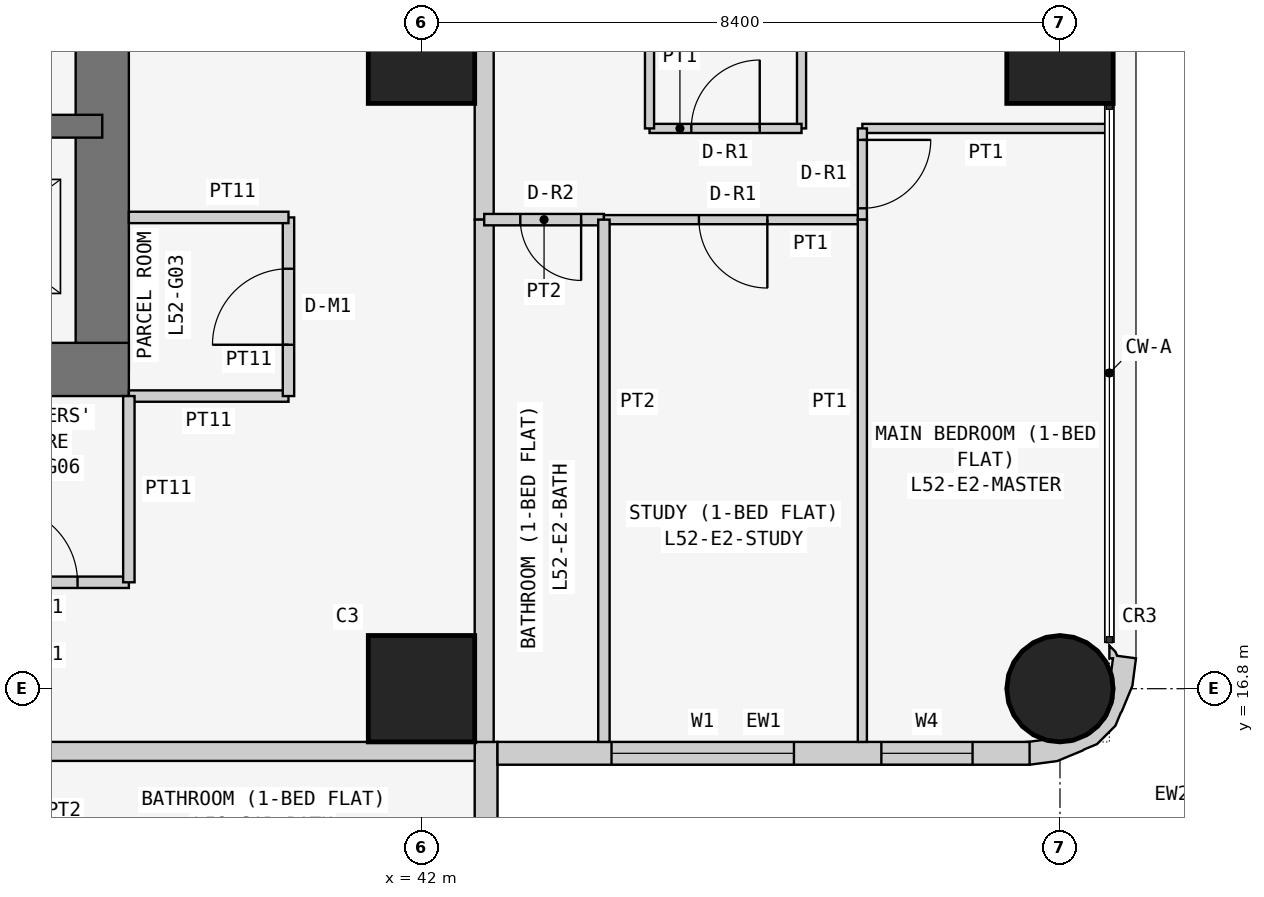
"""IFC4 building model, lengths in metres.
Left out: names, types, materials, properties, quantities, classifications, styles, units other than length and angle.
Written with IfcOpenShell. Run it as: python <this file> out.ifc"""

import sys

from ifc_helpers import new_model, si_unit, direction, frame, frame_2d, origin, origin_2d, place, context, subcontext, project, spatial, polyline, rectangle, circle, outline, extrude, element, fill, save


model = new_model("IFC4")
c1 = context("Model", 3, precision=1e-05, world=origin(), true_north=direction((0.0, 1.0)))
c2 = subcontext(c1, "Body", "Model", "MODEL_VIEW")
j1 = project(units=[si_unit("LENGTHUNIT", "METRE"), si_unit("PLANEANGLEUNIT", "RADIAN")], contexts=[c1])
p1 = place(None, origin())
s1 = spatial("IfcSite", under=j1, at=p1, CompositionType="ELEMENT")
p2 = place(p1, origin())
s2 = spatial("IfcBuilding", under=s1, at=p2, CompositionType="ELEMENT")
p3 = place(p2, frame((0.0, 0.0, 201.3)))
s3 = spatial("IfcBuildingStorey", under=s2, at=p3, CompositionType="ELEMENT", Elevation=201.3)
for number, where, z_axis, x_axis in (
    (1, (42.0, 16.8, 0.0), (0.0, 0.0, 1.0), (1.0, 0.0, 0.0)),
    (2, (42.0, 25.2, 0.0), (0.0, 0.0, 1.0), (1.0, 0.0, 0.0)),
):
    element("IfcColumn", number, at=place(p3, frame(where, z_axis=z_axis, x_axis=x_axis)), inside=s3, PredefinedType="COLUMN", context=c2, shape_type="SweptSolid", body=[
        extrude(rectangle(XDim=1.4, YDim=1.4, at=origin_2d()), origin(), (0.0, 0.0, 1.0), 3.6),
    ])
p4 = place(p3, frame((50.4, 16.8, 0.0), z_axis=(0.0, 0.0, 1.0), x_axis=(1.0, 0.0, 0.0)))
e3 = element("IfcColumn", 3, at=p4, inside=s3, PredefinedType="COLUMN", context=c2, shape_type="SweptSolid", body=[
    extrude(circle(Radius=0.7, at=origin_2d()), origin(), (0.0, 0.0, 1.0), 3.6),
])
p5 = place(p3, frame((50.4, 25.2, 0.0), z_axis=(0.0, 0.0, 1.0), x_axis=(1.0, 0.0, 0.0)))
e4 = element("IfcColumn", 4, at=p5, inside=s3, PredefinedType="COLUMN", context=c2, shape_type="SweptSolid", body=[
    extrude(rectangle(XDim=1.4, YDim=1.4, at=origin_2d()), origin(), (0.0, 0.0, 1.0), 3.6),
])
p6 = place(p3, frame((21.0, 21.0, 0.0), z_axis=(0.0, 0.0, 1.0), x_axis=(1.0, 0.0, 0.0)))
e5 = element("IfcWall", 5, at=p6, inside=s3, PredefinedType="SHEAR", context=c2, shape_type="SweptSolid", body=[
    extrude(rectangle(XDim=17.15, YDim=0.7, at=frame_2d((8.575, 0.0))), origin(), (0.0, 0.0, 1.0), 3.6),
])
p7 = place(p3, frame((37.8, 21.0, 0.0), z_axis=(0.0, 0.0, 1.0), x_axis=(0.0, 1.0, 0.0)))
e6 = element("IfcWall", 6, at=p7, inside=s3, PredefinedType="SHEAR", context=c2, shape_type="SweptSolid", body=[
    extrude(rectangle(XDim=17.15, YDim=0.7, at=frame_2d((8.575, 0.0))), origin(), (0.0, 0.0, 1.0), 3.6),
])
p8 = place(p7, frame((5.2, 0.0, 0.0)))
e7 = element("IfcOpeningElement", 7, at=p8, cuts=e6, PredefinedType="OPENING", context=c2, shape_type="SweptSolid", body=[
    extrude(rectangle(XDim=1.2, YDim=2.1, at=frame_2d((0.6, 1.05))), frame((0.0, 0.36, 0.0), z_axis=(0.0, -1.0, 0.0), x_axis=(1.0, 0.0, 0.0)), (0.0, 0.0, 1.0), 0.72),
])
p9 = place(p3, frame((26.6, 24.2, 0.0), z_axis=(0.0, 0.0, 1.0), x_axis=(1.0, 0.0, 0.0)))
e8 = element("IfcWall", 8, at=p9, inside=s3, PredefinedType="SHEAR", context=c2, shape_type="SweptSolid", body=[
    extrude(rectangle(XDim=11.2, YDim=0.3, at=frame_2d((5.6, 0.0))), origin(), (0.0, 0.0, 1.0), 3.6),
])
p10 = place(p9, frame((0.913, 0.0, 0.0)))
e9 = element("IfcOpeningElement", 9, at=p10, cuts=e8, PredefinedType="OPENING", context=c2, shape_type="SweptSolid", body=[
    extrude(rectangle(XDim=1.0, YDim=2.1, at=frame_2d((0.5, 1.05))), frame((0.0, 0.16, 0.0), z_axis=(0.0, -1.0, 0.0), x_axis=(1.0, 0.0, 0.0)), (0.0, 0.0, 1.0), 0.32),
])
p11 = place(p9, frame((3.75, 0.0, 0.0)))
e10 = element("IfcOpeningElement", 10, at=p11, cuts=e8, PredefinedType="OPENING", context=c2, shape_type="SweptSolid", body=[
    extrude(rectangle(XDim=0.9, YDim=2.1, at=frame_2d((0.45, 1.05))), frame((0.0, 0.16, 0.0), z_axis=(0.0, -1.0, 0.0), x_axis=(1.0, 0.0, 0.0)), (0.0, 0.0, 1.0), 0.32),
])
p12 = place(p9, frame((6.45, 0.0, 0.0)))
e11 = element("IfcOpeningElement", 11, at=p12, cuts=e8, PredefinedType="OPENING", context=c2, shape_type="SweptSolid", body=[
    extrude(rectangle(XDim=1.1, YDim=2.1, at=frame_2d((0.55, 1.05))), frame((0.0, 0.16, 0.0), z_axis=(0.0, -1.0, 0.0), x_axis=(1.0, 0.0, 0.0)), (0.0, 0.0, 1.0), 0.32),
])
p13 = place(p9, frame((9.1, 0.0, 0.0)))
e12 = element("IfcOpeningElement", 12, at=p13, cuts=e8, PredefinedType="OPENING", context=c2, shape_type="SweptSolid", body=[
    extrude(rectangle(XDim=1.1, YDim=2.1, at=frame_2d((0.55, 1.05))), frame((0.0, 0.16, 0.0), z_axis=(0.0, -1.0, 0.0), x_axis=(1.0, 0.0, 0.0)), (0.0, 0.0, 1.0), 0.32),
])
p14 = place(p3, frame((42.85, 8.8, 0.0), z_axis=(0.0, 0.0, 1.0), x_axis=(0.0, 1.0, 0.0)))
e13 = element("IfcWall", 13, at=p14, inside=s3, PredefinedType="SOLIDWALL", context=c2, shape_type="SweptSolid", body=[
    extrude(rectangle(XDim=7.3, YDim=0.3, at=frame_2d((3.65, 0.0))), origin(), (0.0, 0.0, 1.0), 3.45),
])
p15 = place(p14, frame((3.1, 0.0, 0.9)))
e14 = element("IfcOpeningElement", 14, at=p15, cuts=e13, PredefinedType="OPENING", context=c2, shape_type="SweptSolid", body=[
    extrude(rectangle(XDim=2.4, YDim=1.5, at=frame_2d((1.2, 0.75))), frame((0.0, 0.16, 0.0), z_axis=(0.0, -1.0, 0.0), x_axis=(1.0, 0.0, 0.0)), (0.0, 0.0, 1.0), 0.32),
])
p16 = place(p14, frame((0.75, 0.0, 0.9)))
e15 = element("IfcOpeningElement", 15, at=p16, cuts=e13, PredefinedType="OPENING", context=c2, shape_type="SweptSolid", body=[
    extrude(rectangle(XDim=1.2, YDim=1.5, at=frame_2d((0.6, 0.75))), frame((0.0, 0.16, 0.0), z_axis=(0.0, -1.0, 0.0), x_axis=(1.0, 0.0, 0.0)), (0.0, 0.0, 1.0), 0.32),
])
p17 = place(p3, frame((43.0, 15.95, 0.0), z_axis=(0.0, 0.0, 1.0), x_axis=(1.0, 0.0, 0.0)))
e16 = element("IfcWall", 16, at=p17, inside=s3, PredefinedType="SOLIDWALL", context=c2, shape_type="SweptSolid", body=[
    extrude(rectangle(XDim=7.0, YDim=0.3, at=frame_2d((3.5, 0.0))), origin(), (0.0, 0.0, 1.0), 3.45),
])
p18 = place(p17, frame((1.5, 0.0, 0.9)))
e17 = element("IfcOpeningElement", 17, at=p18, cuts=e16, PredefinedType="OPENING", context=c2, shape_type="SweptSolid", body=[
    extrude(rectangle(XDim=2.4, YDim=1.5, at=frame_2d((1.2, 0.75))), frame((0.0, 0.16, 0.0), z_axis=(0.0, -1.0, 0.0), x_axis=(1.0, 0.0, 0.0)), (0.0, 0.0, 1.0), 0.32),
])
p19 = place(p17, frame((5.05, 0.0, 0.9)))
e18 = element("IfcOpeningElement", 18, at=p19, cuts=e16, PredefinedType="OPENING", context=c2, shape_type="SweptSolid", body=[
    extrude(rectangle(XDim=1.2, YDim=1.5, at=frame_2d((0.6, 0.75))), frame((0.0, 0.16, 0.0), z_axis=(0.0, -1.0, 0.0), x_axis=(1.0, 0.0, 0.0)), (0.0, 0.0, 1.0), 0.32),
])
p20 = place(p3, frame((50.11, 16.076, 0.0), z_axis=(0.0, 0.0, 1.0), x_axis=(0.898030234854, -0.439933741929, 0.0)))
e19 = element("IfcWall", 19, at=p20, inside=s3, PredefinedType="SOLIDWALL", context=c2, shape_type="SweptSolid", body=[
    extrude(outline(polyline([(0.664, 1.577), (0.426, 1.497), (0.382, 1.536), (0.276, 1.572), (0.349, 1.423), (0.392, 1.444), (0.453, 1.261), (0.51, 1.211), (0.632, 0.961), (0.65, 0.683), (0.56, 0.419), (0.375, 0.21), (0.125, 0.087), (0.05, 0.082), (-0.128, -0.035), (-0.145, -0.044), (0.022, -0.296), (0.327, -0.094), (0.568, 0.18), (0.577, 0.199), (0.7, 0.337), (0.811, 0.661), (0.799, 0.846), (0.803, 0.866), (0.78, 1.231), (0.664, 1.577)])), origin(), (0.0, 0.0, 1.0), 3.45),
])
p21 = place(p3, frame((38.15, 20.65, 0.0), z_axis=(0.0, 0.0, 1.0), x_axis=(1.0, 0.0, 0.0)))
e20 = element("IfcWall", 20, at=p21, inside=s3, PredefinedType="PARTITIONING", context=c2, shape_type="SweptSolid", body=[
    extrude(rectangle(XDim=2.1, YDim=0.15, at=frame_2d((1.05, 0.0))), origin(), (0.0, 0.0, 1.0), 3.45),
])
p22 = place(p3, frame((40.25, 20.65, 0.0), z_axis=(0.0, 0.0, 1.0), x_axis=(0.0, 1.0, 0.0)))
e21 = element("IfcWall", 21, at=p22, inside=s3, PredefinedType="PARTITIONING", context=c2, shape_type="SweptSolid", body=[
    extrude(rectangle(XDim=2.35, YDim=0.15, at=frame_2d((1.175, 0.0))), origin(), (0.0, 0.0, 1.0), 3.45),
])
p23 = place(p22, frame((0.675, 0.0, 0.0)))
e22 = element("IfcOpeningElement", 22, at=p23, cuts=e21, PredefinedType="OPENING", context=c2, shape_type="SweptSolid", body=[
    extrude(rectangle(XDim=1.0, YDim=2.1, at=frame_2d((0.5, 1.05))), frame((0.0, 0.085, 0.0), z_axis=(0.0, -1.0, 0.0), x_axis=(1.0, 0.0, 0.0)), (0.0, 0.0, 1.0), 0.17),
])
p24 = place(p3, frame((40.25, 23.0, 0.0), z_axis=(0.0, 0.0, 1.0), x_axis=(-1.0, 0.0, 0.0)))
e23 = element("IfcWall", 23, at=p24, inside=s3, PredefinedType="PARTITIONING", context=c2, shape_type="SweptSolid", body=[
    extrude(rectangle(XDim=2.1, YDim=0.15, at=frame_2d((1.05, 0.0))), origin(), (0.0, 0.0, 1.0), 3.45),
])
p25 = place(p3, frame((35.8, 18.2, 0.0), z_axis=(0.0, 0.0, 1.0), x_axis=(1.0, 0.0, 0.0)))
e24 = element("IfcWall", 24, at=p25, inside=s3, PredefinedType="PARTITIONING", context=c2, shape_type="SweptSolid", body=[
    extrude(rectangle(XDim=2.35, YDim=0.15, at=frame_2d((1.175, 0.0))), origin(), (0.0, 0.0, 1.0), 3.45),
])
p26 = place(p25, frame((0.675, 0.0, 0.0)))
e25 = element("IfcOpeningElement", 25, at=p26, cuts=e24, PredefinedType="OPENING", context=c2, shape_type="SweptSolid", body=[
    extrude(rectangle(XDim=1.0, YDim=2.1, at=frame_2d((0.5, 1.05))), frame((0.0, 0.085, 0.0), z_axis=(0.0, -1.0, 0.0), x_axis=(1.0, 0.0, 0.0)), (0.0, 0.0, 1.0), 0.17),
])
p27 = place(p3, frame((38.15, 18.2, 0.0), z_axis=(0.0, 0.0, 1.0), x_axis=(0.0, 1.0, 0.0)))
e26 = element("IfcWall", 26, at=p27, inside=s3, PredefinedType="PARTITIONING", context=c2, shape_type="SweptSolid", body=[
    extrude(rectangle(XDim=2.45, YDim=0.15, at=frame_2d((1.225, 0.0))), origin(), (0.0, 0.0, 1.0), 3.45),
])
p28 = place(p3, frame((42.825, 29.4, 0.0), z_axis=(0.0, 0.0, 1.0), x_axis=(0.0, -1.0, 0.0)))
e27 = element("IfcWall", 27, at=p28, inside=s3, PredefinedType="PARTITIONING", context=c2, shape_type="SweptSolid", body=[
    extrude(rectangle(XDim=6.429, YDim=0.25, at=frame_2d((3.214, 0.0))), origin(), (0.0, 0.0, 1.0), 3.45),
])
p29 = place(p28, frame((0.5, 0.0, 0.0)))
e28 = element("IfcOpeningElement", 28, at=p29, cuts=e27, PredefinedType="OPENING", context=c2, shape_type="SweptSolid", body=[
    extrude(rectangle(XDim=1.0, YDim=2.1, at=frame_2d((0.5, 1.05))), frame((0.0, 0.135, 0.0), z_axis=(0.0, -1.0, 0.0), x_axis=(1.0, 0.0, 0.0)), (0.0, 0.0, 1.0), 0.27),
])
p30 = place(p3, frame((42.825, 22.971, 0.0), z_axis=(0.0, 0.0, 1.0), x_axis=(0.0, -1.0, 0.0)))
e29 = element("IfcWall", 29, at=p30, inside=s3, PredefinedType="PARTITIONING", context=c2, shape_type="SweptSolid", body=[
    extrude(rectangle(XDim=6.871, YDim=0.25, at=frame_2d((3.436, 0.0))), origin(), (0.0, 0.0, 1.0), 3.45),
])
p31 = place(p3, frame((42.7, 15.975, 0.0), z_axis=(0.0, 0.0, 1.0), x_axis=(-1.0, 0.0, 0.0)))
e30 = element("IfcWall", 30, at=p31, inside=s3, PredefinedType="PARTITIONING", context=c2, shape_type="SweptSolid", body=[
    extrude(rectangle(XDim=6.471, YDim=0.25, at=frame_2d((3.235, 0.0))), origin(), (0.0, 0.0, 1.0), 3.45),
])
p32 = place(p3, frame((47.0, 29.4, 0.0), z_axis=(0.0, 0.0, 1.0), x_axis=(0.0, -1.0, 0.0)))
e31 = element("IfcWall", 31, at=p32, inside=s3, PredefinedType="PARTITIONING", context=c2, shape_type="SweptSolid", body=[
    extrude(rectangle(XDim=5.229, YDim=0.12, at=frame_2d((2.615, 0.0))), origin(), (0.0, 0.0, 1.0), 3.45),
])
p33 = place(p3, frame((47.0, 24.171, 0.0), z_axis=(0.0, 0.0, 1.0), x_axis=(-1.0, 0.0, 0.0)))
e32 = element("IfcWall", 32, at=p33, inside=s3, PredefinedType="PARTITIONING", context=c2, shape_type="SweptSolid", body=[
    extrude(rectangle(XDim=2.0, YDim=0.12, at=frame_2d((1.0, 0.0))), origin(), (0.0, 0.0, 1.0), 3.45),
])
p34 = place(p33, frame((0.55, 0.0, 0.0)))
e33 = element("IfcOpeningElement", 33, at=p34, cuts=e32, PredefinedType="OPENING", context=c2, shape_type="SweptSolid", body=[
    extrude(rectangle(XDim=0.9, YDim=2.1, at=frame_2d((0.45, 1.05))), frame((0.0, 0.07, 0.0), z_axis=(0.0, -1.0, 0.0), x_axis=(1.0, 0.0, 0.0)), (0.0, 0.0, 1.0), 0.14),
])
p35 = place(p3, frame((45.0, 24.171, 0.0), z_axis=(0.0, 0.0, 1.0), x_axis=(0.0, 1.0, 0.0)))
e34 = element("IfcWall", 34, at=p35, inside=s3, PredefinedType="PARTITIONING", context=c2, shape_type="SweptSolid", body=[
    extrude(rectangle(XDim=5.229, YDim=0.12, at=frame_2d((2.615, 0.0))), origin(), (0.0, 0.0, 1.0), 3.45),
])
p36 = place(p3, frame((44.4, 22.971, 0.0), z_axis=(0.0, 0.0, 1.0), x_axis=(-1.0, 0.0, 0.0)))
e35 = element("IfcWall", 35, at=p36, inside=s3, PredefinedType="PARTITIONING", context=c2, shape_type="SweptSolid", body=[
    extrude(rectangle(XDim=1.575, YDim=0.15, at=frame_2d((0.788, 0.0))), origin(), (0.0, 0.0, 1.0), 3.45),
])
p37 = place(p36, frame((0.3, 0.0, 0.0)))
e36 = element("IfcOpeningElement", 36, at=p37, cuts=e35, PredefinedType="OPENING", context=c2, shape_type="SweptSolid", body=[
    extrude(rectangle(XDim=0.8, YDim=2.1, at=frame_2d((0.4, 1.05))), frame((0.0, 0.085, 0.0), z_axis=(0.0, -1.0, 0.0), x_axis=(1.0, 0.0, 0.0)), (0.0, 0.0, 1.0), 0.17),
])
p38 = place(p3, frame((47.8, 22.971, 0.0), z_axis=(0.0, 0.0, 1.0), x_axis=(-1.0, 0.0, 0.0)))
e37 = element("IfcWall", 37, at=p38, inside=s3, PredefinedType="PARTITIONING", context=c2, shape_type="SweptSolid", body=[
    extrude(rectangle(XDim=3.4, YDim=0.12, at=frame_2d((1.7, 0.0))), origin(), (0.0, 0.0, 1.0), 3.45),
])
p39 = place(p38, frame((1.25, 0.0, 0.0)))
e38 = element("IfcOpeningElement", 38, at=p39, cuts=e37, PredefinedType="OPENING", context=c2, shape_type="SweptSolid", body=[
    extrude(rectangle(XDim=0.9, YDim=2.1, at=frame_2d((0.45, 1.05))), frame((0.0, 0.07, 0.0), z_axis=(0.0, -1.0, 0.0), x_axis=(1.0, 0.0, 0.0)), (0.0, 0.0, 1.0), 0.14),
])
p40 = place(p3, frame((51.05, 24.171, 0.0), z_axis=(0.0, 0.0, 1.0), x_axis=(-1.0, 0.0, 0.0)))
e39 = element("IfcWall", 39, at=p40, inside=s3, PredefinedType="PARTITIONING", context=c2, shape_type="SweptSolid", body=[
    extrude(rectangle(XDim=3.25, YDim=0.12, at=frame_2d((1.625, 0.0))), origin(), (0.0, 0.0, 1.0), 3.45),
])
p41 = place(p3, frame((47.8, 24.171, 0.0), z_axis=(0.0, 0.0, 1.0), x_axis=(0.0, -1.0, 0.0)))
e40 = element("IfcWall", 40, at=p41, inside=s3, PredefinedType="PARTITIONING", context=c2, shape_type="SweptSolid", body=[
    extrude(rectangle(XDim=1.2, YDim=0.12, at=frame_2d((0.6, 0.0))), origin(), (0.0, 0.0, 1.0), 3.45),
])
p42 = place(p41, frame((0.151, 0.0, 0.0)))
e41 = element("IfcOpeningElement", 41, at=p42, cuts=e40, PredefinedType="OPENING", context=c2, shape_type="SweptSolid", body=[
    extrude(rectangle(XDim=0.9, YDim=2.1, at=frame_2d((0.45, 1.05))), frame((0.0, 0.07, 0.0), z_axis=(0.0, -1.0, 0.0), x_axis=(1.0, 0.0, 0.0)), (0.0, 0.0, 1.0), 0.14),
])
p43 = place(p3, frame((44.4, 22.971, 0.0), z_axis=(0.0, 0.0, 1.0), x_axis=(0.0, -1.0, 0.0)))
e42 = element("IfcWall", 42, at=p43, inside=s3, PredefinedType="PARTITIONING", context=c2, shape_type="SweptSolid", body=[
    extrude(rectangle(XDim=6.871, YDim=0.15, at=frame_2d((3.436, 0.0))), origin(), (0.0, 0.0, 1.0), 3.45),
])
p44 = place(p3, frame((47.8, 22.971, 0.0), z_axis=(0.0, 0.0, 1.0), x_axis=(0.0, -1.0, 0.0)))
e43 = element("IfcWall", 43, at=p44, inside=s3, PredefinedType="PARTITIONING", context=c2, shape_type="SweptSolid", body=[
    extrude(rectangle(XDim=6.871, YDim=0.12, at=frame_2d((3.436, 0.0))), origin(), (0.0, 0.0, 1.0), 3.45),
])
p45 = place(p18, origin())
e44 = element("IfcWindow", 44, at=p45, inside=s3, PartitioningType="SINGLE_PANEL", PredefinedType="WINDOW", context=c2, shape_type="SweptSolid", body=[
    extrude(rectangle(XDim=2.4, YDim=1.5, at=frame_2d((1.2, 0.75))), frame((0.0, 0.03, 0.0), z_axis=(0.0, -1.0, 0.0), x_axis=(1.0, 0.0, 0.0)), (0.0, 0.0, 1.0), 0.06),
])
fill(e17, e44)
p46 = place(p19, origin())
e45 = element("IfcWindow", 45, at=p46, inside=s3, PartitioningType="SINGLE_PANEL", PredefinedType="WINDOW", context=c2, shape_type="SweptSolid", body=[
    extrude(rectangle(XDim=1.2, YDim=1.5, at=frame_2d((0.6, 0.75))), frame((0.0, 0.03, 0.0), z_axis=(0.0, -1.0, 0.0), x_axis=(1.0, 0.0, 0.0)), (0.0, 0.0, 1.0), 0.06),
])
fill(e18, e45)
p47 = place(p23, origin())
e46 = element("IfcDoor", 46, at=p47, inside=s3, OperationType="SINGLE_SWING_LEFT", PredefinedType="DOOR", context=c2, shape_type="SweptSolid", body=[
    extrude(rectangle(XDim=1.0, YDim=2.1, at=frame_2d((0.5, 1.05))), frame((0.0, 0.025, 0.0), z_axis=(0.0, -1.0, 0.0), x_axis=(1.0, 0.0, 0.0)), (0.0, 0.0, 1.0), 0.05),
])
fill(e22, e46)
p48 = place(p26, origin())
e47 = element("IfcDoor", 47, at=p48, inside=s3, OperationType="SINGLE_SWING_LEFT", PredefinedType="DOOR", context=c2, shape_type="SweptSolid", body=[
    extrude(rectangle(XDim=1.0, YDim=2.1, at=frame_2d((0.5, 1.05))), frame((0.0, 0.025, 0.0), z_axis=(0.0, -1.0, 0.0), x_axis=(1.0, 0.0, 0.0)), (0.0, 0.0, 1.0), 0.05),
])
fill(e25, e47)
p49 = place(p34, frame((0.9, 0.0, 0.0), z_axis=(0.0, 0.0, 1.0), x_axis=(-1.0, 0.0, 0.0)))
e48 = element("IfcDoor", 48, at=p49, inside=s3, OperationType="SINGLE_SWING_RIGHT", PredefinedType="DOOR", context=c2, shape_type="SweptSolid", body=[
    extrude(rectangle(XDim=0.9, YDim=2.1, at=frame_2d((0.45, 1.05))), frame((0.0, 0.025, 0.0), z_axis=(0.0, -1.0, 0.0), x_axis=(1.0, 0.0, 0.0)), (0.0, 0.0, 1.0), 0.05),
])
fill(e33, e48)
p50 = place(p37, origin())
e49 = element("IfcDoor", 49, at=p50, inside=s3, OperationType="SINGLE_SWING_LEFT", PredefinedType="DOOR", context=c2, shape_type="SweptSolid", body=[
    extrude(rectangle(XDim=0.8, YDim=2.1, at=frame_2d((0.4, 1.05))), frame((0.0, 0.025, 0.0), z_axis=(0.0, -1.0, 0.0), x_axis=(1.0, 0.0, 0.0)), (0.0, 0.0, 1.0), 0.05),
])
fill(e36, e49)
p51 = place(p39, origin())
e50 = element("IfcDoor", 50, at=p51, inside=s3, OperationType="SINGLE_SWING_LEFT", PredefinedType="DOOR", context=c2, shape_type="SweptSolid", body=[
    extrude(rectangle(XDim=0.9, YDim=2.1, at=frame_2d((0.45, 1.05))), frame((0.0, 0.025, 0.0), z_axis=(0.0, -1.0, 0.0), x_axis=(1.0, 0.0, 0.0)), (0.0, 0.0, 1.0), 0.05),
])
fill(e38, e50)
p52 = place(p42, origin())
e51 = element("IfcDoor", 51, at=p52, inside=s3, OperationType="SINGLE_SWING_LEFT", PredefinedType="DOOR", context=c2, shape_type="SweptSolid", body=[
    extrude(rectangle(XDim=0.9, YDim=2.1, at=frame_2d((0.45, 1.05))), frame((0.0, 0.025, 0.0), z_axis=(0.0, -1.0, 0.0), x_axis=(1.0, 0.0, 0.0)), (0.0, 0.0, 1.0), 0.05),
])
fill(e41, e51)
save(model, sys.argv[1])
